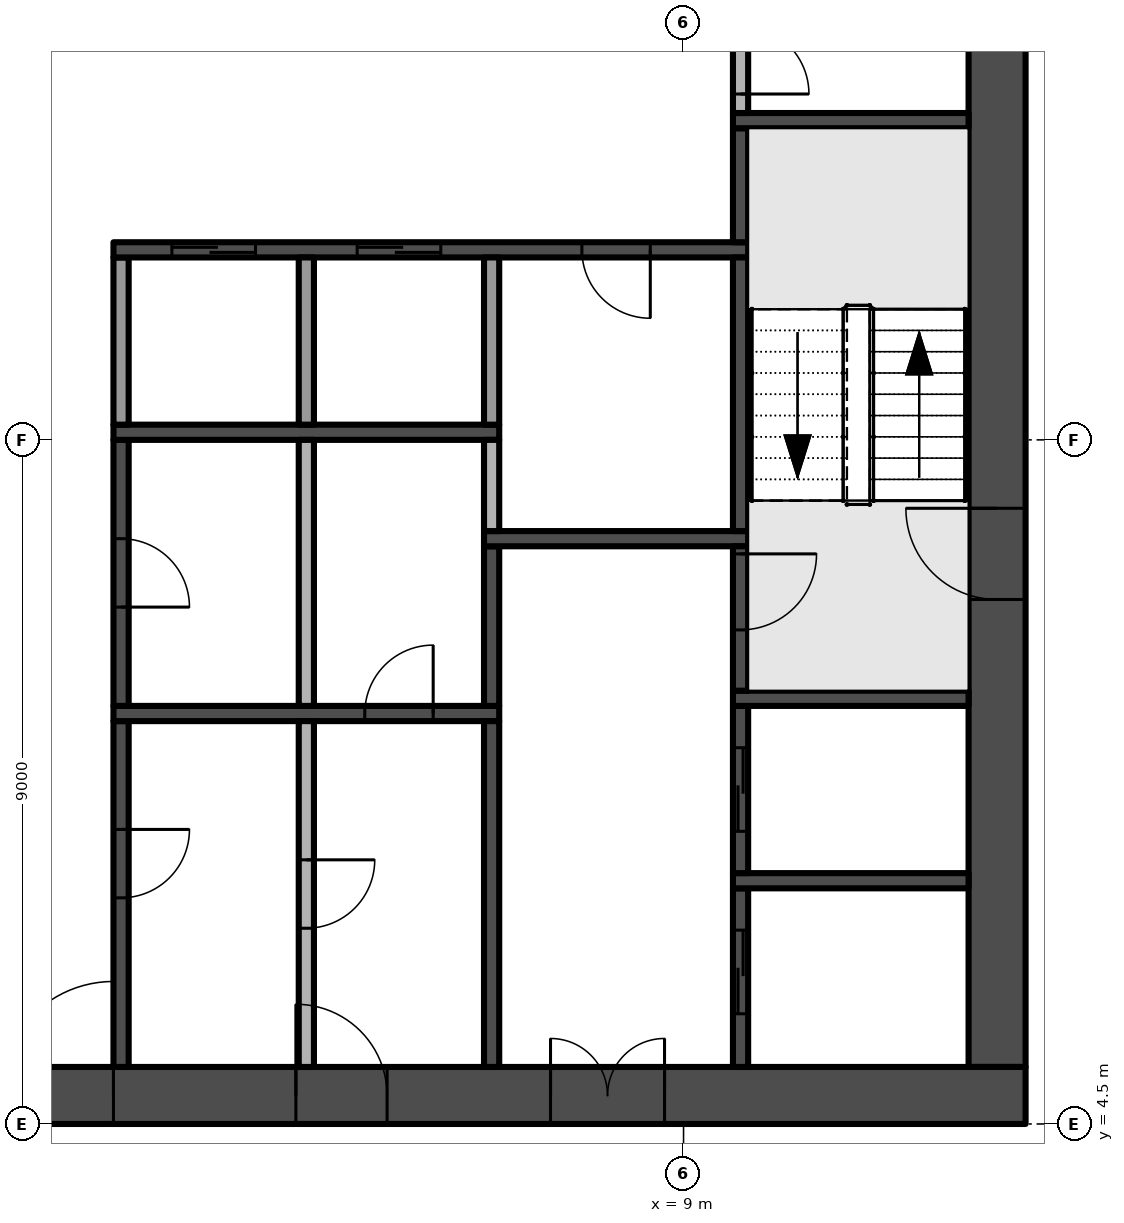
"""IFC4 building model, lengths in metres.
Left out: names, types, materials, properties, quantities, classifications, styles, units other than length and angle.
Written with IfcOpenShell. Run it as: python <this file> out.ifc"""

import sys

from ifc_helpers import new_model, si_unit, direction, frame, frame_2d, origin, place, context, subcontext, project, spatial, rectangle, extrude, element, fill, save


model = new_model("IFC4")
c1 = context("Model", 3, precision=1e-05, world=origin(), true_north=direction((0.0, 1.0)))
c2 = subcontext(c1, "Body", "Model", "MODEL_VIEW")
j1 = project(units=[si_unit("LENGTHUNIT", "METRE"), si_unit("PLANEANGLEUNIT", "RADIAN")], contexts=[c1])
p1 = place(None, origin())
s1 = spatial("IfcSite", under=j1, at=p1, CompositionType="ELEMENT")
p2 = place(p1, origin())
s2 = spatial("IfcBuilding", under=s1, at=p2, CompositionType="ELEMENT")
p3 = place(p2, frame((0.0, 0.0, 174.4)))
s3 = spatial("IfcBuildingStorey", under=s2, at=p3, CompositionType="ELEMENT", Elevation=174.4)
p4 = place(p3, frame((-13.5, 4.875, -0.3), z_axis=(0.0, 0.0, 1.0), x_axis=(1.0, 0.0, 0.0)))
e1 = element("IfcWall", 1, at=p4, inside=s3, PredefinedType="SHEAR", context=c2, shape_type="SweptSolid", body=[
    extrude(rectangle(XDim=27.0, YDim=0.75, at=frame_2d((13.5, 0.0))), origin(), (0.0, 0.0, 1.0), 5.0),
])
p5 = place(p4, frame((12.0, 0.0, 0.3)))
e2 = element("IfcOpeningElement", 2, at=p5, cuts=e1, PredefinedType="OPENING", context=c2, shape_type="SweptSolid", body=[
    extrude(rectangle(XDim=3.0, YDim=2.4, at=frame_2d((1.5, 1.2))), frame((0.0, 0.385, 0.0), z_axis=(0.0, -1.0, 0.0), x_axis=(1.0, 0.0, 0.0)), (0.0, 0.0, 1.0), 0.77),
])
p6 = place(p4, frame((4.9, 0.0, 0.3)))
e3 = element("IfcOpeningElement", 3, at=p6, cuts=e1, PredefinedType="OPENING", context=c2, shape_type="SweptSolid", body=[
    extrude(rectangle(XDim=1.2, YDim=2.2, at=frame_2d((0.6, 1.1))), frame((0.0, 0.385, 0.0), z_axis=(0.0, -1.0, 0.0), x_axis=(1.0, 0.0, 0.0)), (0.0, 0.0, 1.0), 0.77),
])
p7 = place(p4, frame((20.75, 0.0, 0.3)))
e4 = element("IfcOpeningElement", 4, at=p7, cuts=e1, PredefinedType="OPENING", context=c2, shape_type="SweptSolid", body=[
    extrude(rectangle(XDim=1.5, YDim=2.2, at=frame_2d((0.75, 1.1))), frame((0.0, 0.385, 0.0), z_axis=(0.0, -1.0, 0.0), x_axis=(1.0, 0.0, 0.0)), (0.0, 0.0, 1.0), 0.77),
])
p8 = place(p4, frame((17.4, 0.0, 0.3)))
e5 = element("IfcOpeningElement", 5, at=p8, cuts=e1, PredefinedType="OPENING", context=c2, shape_type="SweptSolid", body=[
    extrude(rectangle(XDim=1.2, YDim=2.2, at=frame_2d((0.6, 1.1))), frame((0.0, 0.385, 0.0), z_axis=(0.0, -1.0, 0.0), x_axis=(1.0, 0.0, 0.0)), (0.0, 0.0, 1.0), 0.77),
])
p9 = place(p3, frame((13.125, 5.25, -0.3), z_axis=(0.0, 0.0, 1.0), x_axis=(0.0, 1.0, 0.0)))
e6 = element("IfcWall", 6, at=p9, inside=s3, PredefinedType="SHEAR", context=c2, shape_type="SweptSolid", body=[
    extrude(rectangle(XDim=16.5, YDim=0.75, at=frame_2d((8.25, 0.0))), origin(), (0.0, 0.0, 1.0), 5.0),
])
p10 = place(p9, frame((6.15, 0.0, 0.3)))
e7 = element("IfcOpeningElement", 7, at=p10, cuts=e6, PredefinedType="OPENING", context=c2, shape_type="SweptSolid", body=[
    extrude(rectangle(XDim=1.2, YDim=2.2, at=frame_2d((0.6, 1.1))), frame((0.0, 0.385, 0.0), z_axis=(0.0, -1.0, 0.0), x_axis=(1.0, 0.0, 0.0)), (0.0, 0.0, 1.0), 0.77),
])
p11 = place(p3, frame((1.6, 9.8, 0.0), z_axis=(0.0, 0.0, 1.0), x_axis=(0.0, -1.0, 0.0)))
e8 = element("IfcWall", 8, at=p11, inside=s3, PredefinedType="SHEAR", context=c2, shape_type="SweptSolid", body=[
    extrude(rectangle(XDim=4.55, YDim=0.2, at=frame_2d((2.275, 0.0))), origin(), (0.0, 0.0, 1.0), 4.7),
])
p12 = place(p11, frame((1.425, 0.0, 0.0)))
e9 = element("IfcOpeningElement", 9, at=p12, cuts=e8, PredefinedType="OPENING", context=c2, shape_type="SweptSolid", body=[
    extrude(rectangle(XDim=0.9, YDim=2.1, at=frame_2d((0.45, 1.05))), frame((0.0, 0.11, 0.0), z_axis=(0.0, -1.0, 0.0), x_axis=(1.0, 0.0, 0.0)), (0.0, 0.0, 1.0), 0.22),
])
p13 = place(p3, frame((1.5, 9.9, 0.0), z_axis=(0.0, 0.0, 1.0), x_axis=(1.0, 0.0, 0.0)))
e10 = element("IfcWall", 10, at=p13, inside=s3, PredefinedType="SHEAR", context=c2, shape_type="SweptSolid", body=[
    extrude(rectangle(XDim=5.075, YDim=0.2, at=frame_2d((2.538, 0.0))), origin(), (0.0, 0.0, 1.0), 4.7),
])
p14 = place(p13, frame((3.306, 0.0, 0.0)))
e11 = element("IfcOpeningElement", 11, at=p14, cuts=e10, PredefinedType="OPENING", context=c2, shape_type="SweptSolid", body=[
    extrude(rectangle(XDim=0.9, YDim=2.1, at=frame_2d((0.45, 1.05))), frame((0.0, 0.11, 0.0), z_axis=(0.0, -1.0, 0.0), x_axis=(1.0, 0.0, 0.0)), (0.0, 0.0, 1.0), 0.22),
])
p15 = place(p3, frame((1.6, 13.5, 0.0), z_axis=(0.0, 0.0, 1.0), x_axis=(0.0, -1.0, 0.0)))
e12 = element("IfcWall", 12, at=p15, inside=s3, PredefinedType="SHEAR", context=c2, shape_type="SweptSolid", body=[
    extrude(rectangle(XDim=3.5, YDim=0.2, at=frame_2d((1.75, 0.0))), origin(), (0.0, 0.0, 1.0), 4.7),
])
p16 = place(p15, frame((1.3, 0.0, 0.0)))
e13 = element("IfcOpeningElement", 13, at=p16, cuts=e12, PredefinedType="OPENING", context=c2, shape_type="SweptSolid", body=[
    extrude(rectangle(XDim=0.9, YDim=2.1, at=frame_2d((0.45, 1.05))), frame((0.0, 0.11, 0.0), z_axis=(0.0, -1.0, 0.0), x_axis=(1.0, 0.0, 0.0)), (0.0, 0.0, 1.0), 0.22),
])
p17 = place(p3, frame((1.5, 13.6, 0.0), z_axis=(0.0, 0.0, 1.0), x_axis=(1.0, 0.0, 0.0)))
e14 = element("IfcWall", 14, at=p17, inside=s3, PredefinedType="SHEAR", context=c2, shape_type="SweptSolid", body=[
    extrude(rectangle(XDim=5.075, YDim=0.2, at=frame_2d((2.538, 0.0))), origin(), (0.0, 0.0, 1.0), 4.7),
])
p18 = place(p3, frame((1.6, 13.7, 0.0), z_axis=(0.0, 0.0, 1.0), x_axis=(0.0, 1.0, 0.0)))
e15 = element("IfcWall", 15, at=p18, inside=s3, PredefinedType="PARTITIONING", context=c2, shape_type="SweptSolid", body=[
    extrude(rectangle(XDim=2.2, YDim=0.2, at=frame_2d((1.1, 0.0))), origin(), (0.0, 0.0, 1.0), 4.7),
])
p19 = place(p3, frame((9.85, 16.0, 0.0), z_axis=(0.0, 0.0, 1.0), x_axis=(-1.0, 0.0, 0.0)))
e16 = element("IfcWall", 16, at=p19, inside=s3, PredefinedType="SHEAR", context=c2, shape_type="SweptSolid", body=[
    extrude(rectangle(XDim=8.35, YDim=0.2, at=frame_2d((4.175, 0.0))), origin(), (0.0, 0.0, 1.0), 4.7),
])
p20 = place(p19, frame((6.481, 0.0, 0.0)))
e17 = element("IfcOpeningElement", 17, at=p20, cuts=e16, PredefinedType="OPENING", context=c2, shape_type="SweptSolid", body=[
    extrude(rectangle(XDim=1.1, YDim=2.1, at=frame_2d((0.55, 1.05))), frame((0.0, 0.11, 0.0), z_axis=(0.0, -1.0, 0.0), x_axis=(1.0, 0.0, 0.0)), (0.0, 0.0, 1.0), 0.22),
])
p21 = place(p19, frame((4.044, 0.0, 0.0)))
e18 = element("IfcOpeningElement", 18, at=p21, cuts=e16, PredefinedType="OPENING", context=c2, shape_type="SweptSolid", body=[
    extrude(rectangle(XDim=1.1, YDim=2.1, at=frame_2d((0.55, 1.05))), frame((0.0, 0.11, 0.0), z_axis=(0.0, -1.0, 0.0), x_axis=(1.0, 0.0, 0.0)), (0.0, 0.0, 1.0), 0.22),
])
p22 = place(p19, frame((1.288, 0.0, 0.0)))
e19 = element("IfcOpeningElement", 19, at=p22, cuts=e16, PredefinedType="OPENING", context=c2, shape_type="SweptSolid", body=[
    extrude(rectangle(XDim=0.9, YDim=2.1, at=frame_2d((0.45, 1.05))), frame((0.0, 0.11, 0.0), z_axis=(0.0, -1.0, 0.0), x_axis=(1.0, 0.0, 0.0)), (0.0, 0.0, 1.0), 0.22),
])
p23 = place(p3, frame((4.037, 9.8, 0.0), z_axis=(0.0, 0.0, 1.0), x_axis=(0.0, -1.0, 0.0)))
e20 = element("IfcWall", 20, at=p23, inside=s3, PredefinedType="PARTITIONING", context=c2, shape_type="SweptSolid", body=[
    extrude(rectangle(XDim=4.55, YDim=0.2, at=frame_2d((2.275, 0.0))), origin(), (0.0, 0.0, 1.0), 4.7),
])
p24 = place(p23, frame((1.825, 0.0, 0.0)))
e21 = element("IfcOpeningElement", 21, at=p24, cuts=e20, PredefinedType="OPENING", context=c2, shape_type="SweptSolid", body=[
    extrude(rectangle(XDim=0.9, YDim=2.1, at=frame_2d((0.45, 1.05))), frame((0.0, 0.11, 0.0), z_axis=(0.0, -1.0, 0.0), x_axis=(1.0, 0.0, 0.0)), (0.0, 0.0, 1.0), 0.22),
])
p25 = place(p3, frame((4.037, 10.0, 0.0), z_axis=(0.0, 0.0, 1.0), x_axis=(0.0, 1.0, 0.0)))
e22 = element("IfcWall", 22, at=p25, inside=s3, PredefinedType="PARTITIONING", context=c2, shape_type="SweptSolid", body=[
    extrude(rectangle(XDim=3.5, YDim=0.2, at=frame_2d((1.75, 0.0))), origin(), (0.0, 0.0, 1.0), 4.7),
])
p26 = place(p3, frame((4.037, 13.7, 0.0), z_axis=(0.0, 0.0, 1.0), x_axis=(0.0, 1.0, 0.0)))
e23 = element("IfcWall", 23, at=p26, inside=s3, PredefinedType="PARTITIONING", context=c2, shape_type="SweptSolid", body=[
    extrude(rectangle(XDim=2.2, YDim=0.2, at=frame_2d((1.1, 0.0))), origin(), (0.0, 0.0, 1.0), 4.7),
])
p27 = place(p3, frame((6.475, 5.25, 0.0), z_axis=(0.0, 0.0, 1.0), x_axis=(0.0, 1.0, 0.0)))
e24 = element("IfcWall", 24, at=p27, inside=s3, PredefinedType="SHEAR", context=c2, shape_type="SweptSolid", body=[
    extrude(rectangle(XDim=4.55, YDim=0.2, at=frame_2d((2.275, 0.0))), origin(), (0.0, 0.0, 1.0), 4.7),
])
p28 = place(p3, frame((6.475, 10.0, 0.0), z_axis=(0.0, 0.0, 1.0), x_axis=(0.0, 1.0, 0.0)))
e25 = element("IfcWall", 25, at=p28, inside=s3, PredefinedType="SHEAR", context=c2, shape_type="SweptSolid", body=[
    extrude(rectangle(XDim=2.1, YDim=0.2, at=frame_2d((1.05, 0.0))), origin(), (0.0, 0.0, 1.0), 4.7),
])
p29 = place(p3, frame((6.375, 12.2, 0.0), z_axis=(0.0, 0.0, 1.0), x_axis=(1.0, 0.0, 0.0)))
e26 = element("IfcWall", 26, at=p29, inside=s3, PredefinedType="SHEAR", context=c2, shape_type="SweptSolid", body=[
    extrude(rectangle(XDim=3.475, YDim=0.2, at=frame_2d((1.738, 0.0))), origin(), (0.0, 0.0, 1.0), 4.7),
])
p30 = place(p3, frame((6.475, 12.3, 0.0), z_axis=(0.0, 0.0, 1.0), x_axis=(0.0, 1.0, 0.0)))
e27 = element("IfcWall", 27, at=p30, inside=s3, PredefinedType="PARTITIONING", context=c2, shape_type="SweptSolid", body=[
    extrude(rectangle(XDim=1.2, YDim=0.2, at=frame_2d((0.6, 0.0))), origin(), (0.0, 0.0, 1.0), 4.7),
])
p31 = place(p3, frame((6.475, 13.7, 0.0), z_axis=(0.0, 0.0, 1.0), x_axis=(0.0, 1.0, 0.0)))
e28 = element("IfcWall", 28, at=p31, inside=s3, PredefinedType="PARTITIONING", context=c2, shape_type="SweptSolid", body=[
    extrude(rectangle(XDim=2.2, YDim=0.2, at=frame_2d((1.1, 0.0))), origin(), (0.0, 0.0, 1.0), 4.7),
])
p32 = place(p3, frame((9.75, 5.25, 0.0), z_axis=(0.0, 0.0, 1.0), x_axis=(0.0, 1.0, 0.0)))
e29 = element("IfcWall", 29, at=p32, inside=s3, PredefinedType="SHEAR", context=c2, shape_type="SweptSolid", body=[
    extrude(rectangle(XDim=2.35, YDim=0.2, at=frame_2d((1.175, 0.0))), origin(), (0.0, 0.0, 1.0), 4.7),
])
p33 = place(p32, frame((0.7, 0.0, 0.0)))
e30 = element("IfcOpeningElement", 30, at=p33, cuts=e29, PredefinedType="OPENING", context=c2, shape_type="SweptSolid", body=[
    extrude(rectangle(XDim=1.1, YDim=2.1, at=frame_2d((0.55, 1.05))), frame((0.0, 0.11, 0.0), z_axis=(0.0, -1.0, 0.0), x_axis=(1.0, 0.0, 0.0)), (0.0, 0.0, 1.0), 0.22),
])
p34 = place(p3, frame((9.65, 7.7, 0.0), z_axis=(0.0, 0.0, 1.0), x_axis=(1.0, 0.0, 0.0)))
e31 = element("IfcWall", 31, at=p34, inside=s3, PredefinedType="SHEAR", context=c2, shape_type="SweptSolid", body=[
    extrude(rectangle(XDim=3.1, YDim=0.2, at=frame_2d((1.55, 0.0))), origin(), (0.0, 0.0, 1.0), 4.7),
])
p35 = place(p3, frame((9.75, 7.8, 0.0), z_axis=(0.0, 0.0, 1.0), x_axis=(0.0, 1.0, 0.0)))
e32 = element("IfcWall", 32, at=p35, inside=s3, PredefinedType="SHEAR", context=c2, shape_type="SweptSolid", body=[
    extrude(rectangle(XDim=2.2, YDim=0.2, at=frame_2d((1.1, 0.0))), origin(), (0.0, 0.0, 1.0), 4.7),
])
p36 = place(p35, frame((0.55, 0.0, 0.0)))
e33 = element("IfcOpeningElement", 33, at=p36, cuts=e32, PredefinedType="OPENING", context=c2, shape_type="SweptSolid", body=[
    extrude(rectangle(XDim=1.1, YDim=2.1, at=frame_2d((0.55, 1.05))), frame((0.0, 0.11, 0.0), z_axis=(0.0, -1.0, 0.0), x_axis=(1.0, 0.0, 0.0)), (0.0, 0.0, 1.0), 0.22),
])
p37 = place(p3, frame((9.65, 10.1, 0.0), z_axis=(0.0, 0.0, 1.0), x_axis=(1.0, 0.0, 0.0)))
e34 = element("IfcWall", 34, at=p37, inside=s3, PredefinedType="SHEAR", context=c2, shape_type="SweptSolid", body=[
    extrude(rectangle(XDim=3.1, YDim=0.2, at=frame_2d((1.55, 0.0))), origin(), (0.0, 0.0, 1.0), 4.7),
])
p38 = place(p3, frame((9.75, 12.1, 0.0), z_axis=(0.0, 0.0, 1.0), x_axis=(0.0, -1.0, 0.0)))
e35 = element("IfcWall", 35, at=p38, inside=s3, PredefinedType="SHEAR", context=c2, shape_type="SweptSolid", body=[
    extrude(rectangle(XDim=1.9, YDim=0.2, at=frame_2d((0.95, 0.0))), origin(), (0.0, 0.0, 1.0), 4.7),
])
p39 = place(p38, frame((0.1, 0.0, 0.0)))
e36 = element("IfcOpeningElement", 36, at=p39, cuts=e35, PredefinedType="OPENING", context=c2, shape_type="SweptSolid", body=[
    extrude(rectangle(XDim=1.0, YDim=2.2, at=frame_2d((0.5, 1.1))), frame((0.0, 0.11, 0.0), z_axis=(0.0, -1.0, 0.0), x_axis=(1.0, 0.0, 0.0)), (0.0, 0.0, 1.0), 0.22),
])
p40 = place(p3, frame((9.75, 12.3, 0.0), z_axis=(0.0, 0.0, 1.0), x_axis=(0.0, 1.0, 0.0)))
e37 = element("IfcWall", 37, at=p40, inside=s3, PredefinedType="SHEAR", context=c2, shape_type="SweptSolid", body=[
    extrude(rectangle(XDim=3.6, YDim=0.2, at=frame_2d((1.8, 0.0))), origin(), (0.0, 0.0, 1.0), 4.7),
])
p41 = place(p3, frame((9.75, 16.1, 0.0), z_axis=(0.0, 0.0, 1.0), x_axis=(0.0, 1.0, 0.0)))
e38 = element("IfcWall", 38, at=p41, inside=s3, PredefinedType="SHEAR", context=c2, shape_type="SweptSolid", body=[
    extrude(rectangle(XDim=1.5, YDim=0.2, at=frame_2d((0.75, 0.0))), origin(), (0.0, 0.0, 1.0), 4.7),
])
p42 = place(p3, frame((9.65, 17.7, 0.0), z_axis=(0.0, 0.0, 1.0), x_axis=(1.0, 0.0, 0.0)))
e39 = element("IfcWall", 39, at=p42, inside=s3, PredefinedType="SHEAR", context=c2, shape_type="SweptSolid", body=[
    extrude(rectangle(XDim=3.1, YDim=0.2, at=frame_2d((1.55, 0.0))), origin(), (0.0, 0.0, 1.0), 4.7),
])
p43 = place(p3, frame((9.75, 19.2, 0.0), z_axis=(0.0, 0.0, 1.0), x_axis=(0.0, -1.0, 0.0)))
e40 = element("IfcWall", 40, at=p43, inside=s3, PredefinedType="PARTITIONING", context=c2, shape_type="SweptSolid", body=[
    extrude(rectangle(XDim=1.4, YDim=0.2, at=frame_2d((0.7, 0.0))), origin(), (0.0, 0.0, 1.0), 4.7),
])
p44 = place(p43, frame((0.25, 0.0, 0.0)))
e41 = element("IfcOpeningElement", 41, at=p44, cuts=e40, PredefinedType="OPENING", context=c2, shape_type="SweptSolid", body=[
    extrude(rectangle(XDim=0.9, YDim=2.1, at=frame_2d((0.45, 1.05))), frame((0.0, 0.11, 0.0), z_axis=(0.0, -1.0, 0.0), x_axis=(1.0, 0.0, 0.0)), (0.0, 0.0, 1.0), 0.22),
])
p45 = place(p5, frame((3.0, 0.0, 0.0), z_axis=(0.0, 0.0, 1.0), x_axis=(-1.0, 0.0, 0.0)))
e42 = element("IfcDoor", 42, at=p45, inside=s3, OperationType="DOUBLE_DOOR_SINGLE_SWING", PredefinedType="DOOR", context=c2, shape_type="SweptSolid", body=[
    extrude(rectangle(XDim=3.0, YDim=2.4, at=frame_2d((1.5, 1.2))), frame((0.0, 0.025, 0.0), z_axis=(0.0, -1.0, 0.0), x_axis=(1.0, 0.0, 0.0)), (0.0, 0.0, 1.0), 0.05),
])
fill(e2, e42)
p46 = place(p10, frame((1.2, 0.0, 0.0), z_axis=(0.0, 0.0, 1.0), x_axis=(-1.0, 0.0, 0.0)))
e43 = element("IfcDoor", 43, at=p46, inside=s3, OperationType="SINGLE_SWING_LEFT", PredefinedType="DOOR", context=c2, shape_type="SweptSolid", body=[
    extrude(rectangle(XDim=1.2, YDim=2.2, at=frame_2d((0.6, 1.1))), frame((0.0, 0.025, 0.0), z_axis=(0.0, -1.0, 0.0), x_axis=(1.0, 0.0, 0.0)), (0.0, 0.0, 1.0), 0.05),
])
fill(e7, e43)
p47 = place(p7, frame((1.5, 0.0, 0.0), z_axis=(0.0, 0.0, 1.0), x_axis=(-1.0, 0.0, 0.0)))
e44 = element("IfcDoor", 44, at=p47, inside=s3, OperationType="DOUBLE_DOOR_SINGLE_SWING", PredefinedType="DOOR", context=c2, shape_type="SweptSolid", body=[
    extrude(rectangle(XDim=1.5, YDim=2.2, at=frame_2d((0.75, 1.1))), frame((0.0, 0.025, 0.0), z_axis=(0.0, -1.0, 0.0), x_axis=(1.0, 0.0, 0.0)), (0.0, 0.0, 1.0), 0.05),
])
fill(e4, e44)
p48 = place(p8, frame((1.2, 0.0, 0.0), z_axis=(0.0, 0.0, 1.0), x_axis=(-1.0, 0.0, 0.0)))
e45 = element("IfcDoor", 45, at=p48, inside=s3, OperationType="SINGLE_SWING_RIGHT", PredefinedType="DOOR", context=c2, shape_type="SweptSolid", body=[
    extrude(rectangle(XDim=1.2, YDim=2.2, at=frame_2d((0.6, 1.1))), frame((0.0, 0.025, 0.0), z_axis=(0.0, -1.0, 0.0), x_axis=(1.0, 0.0, 0.0)), (0.0, 0.0, 1.0), 0.05),
])
fill(e5, e45)
p49 = place(p39, origin())
e46 = element("IfcDoor", 46, at=p49, inside=s3, OperationType="SINGLE_SWING_LEFT", PredefinedType="DOOR", context=c2, shape_type="SweptSolid", body=[
    extrude(rectangle(XDim=1.0, YDim=2.2, at=frame_2d((0.5, 1.1))), frame((0.0, 0.025, 0.0), z_axis=(0.0, -1.0, 0.0), x_axis=(1.0, 0.0, 0.0)), (0.0, 0.0, 1.0), 0.05),
])
fill(e36, e46)
p50 = place(p20, origin())
e47 = element("IfcDoor", 47, at=p50, inside=s3, OperationType="SLIDING_TO_RIGHT", PredefinedType="DOOR", context=c2, shape_type="SweptSolid", body=[
    extrude(rectangle(XDim=1.1, YDim=2.1, at=frame_2d((0.55, 1.05))), frame((0.0, 0.025, 0.0), z_axis=(0.0, -1.0, 0.0), x_axis=(1.0, 0.0, 0.0)), (0.0, 0.0, 1.0), 0.05),
])
fill(e17, e47)
p51 = place(p21, origin())
e48 = element("IfcDoor", 48, at=p51, inside=s3, OperationType="SLIDING_TO_RIGHT", PredefinedType="DOOR", context=c2, shape_type="SweptSolid", body=[
    extrude(rectangle(XDim=1.1, YDim=2.1, at=frame_2d((0.55, 1.05))), frame((0.0, 0.025, 0.0), z_axis=(0.0, -1.0, 0.0), x_axis=(1.0, 0.0, 0.0)), (0.0, 0.0, 1.0), 0.05),
])
fill(e18, e48)
p52 = place(p33, origin())
e49 = element("IfcDoor", 49, at=p52, inside=s3, OperationType="SLIDING_TO_RIGHT", PredefinedType="DOOR", context=c2, shape_type="SweptSolid", body=[
    extrude(rectangle(XDim=1.1, YDim=2.1, at=frame_2d((0.55, 1.05))), frame((0.0, 0.025, 0.0), z_axis=(0.0, -1.0, 0.0), x_axis=(1.0, 0.0, 0.0)), (0.0, 0.0, 1.0), 0.05),
])
fill(e30, e49)
p53 = place(p36, origin())
e50 = element("IfcDoor", 50, at=p53, inside=s3, OperationType="SLIDING_TO_RIGHT", PredefinedType="DOOR", context=c2, shape_type="SweptSolid", body=[
    extrude(rectangle(XDim=1.1, YDim=2.1, at=frame_2d((0.55, 1.05))), frame((0.0, 0.025, 0.0), z_axis=(0.0, -1.0, 0.0), x_axis=(1.0, 0.0, 0.0)), (0.0, 0.0, 1.0), 0.05),
])
fill(e33, e50)
p54 = place(p12, origin())
e51 = element("IfcDoor", 51, at=p54, inside=s3, OperationType="SINGLE_SWING_LEFT", PredefinedType="DOOR", context=c2, shape_type="SweptSolid", body=[
    extrude(rectangle(XDim=0.9, YDim=2.1, at=frame_2d((0.45, 1.05))), frame((0.0, 0.025, 0.0), z_axis=(0.0, -1.0, 0.0), x_axis=(1.0, 0.0, 0.0)), (0.0, 0.0, 1.0), 0.05),
])
fill(e9, e51)
p55 = place(p24, origin())
e52 = element("IfcDoor", 52, at=p55, inside=s3, OperationType="SINGLE_SWING_LEFT", PredefinedType="DOOR", context=c2, shape_type="SweptSolid", body=[
    extrude(rectangle(XDim=0.9, YDim=2.1, at=frame_2d((0.45, 1.05))), frame((0.0, 0.025, 0.0), z_axis=(0.0, -1.0, 0.0), x_axis=(1.0, 0.0, 0.0)), (0.0, 0.0, 1.0), 0.05),
])
fill(e21, e52)
p56 = place(p16, origin())
e53 = element("IfcDoor", 53, at=p56, inside=s3, OperationType="SINGLE_SWING_RIGHT", PredefinedType="DOOR", context=c2, shape_type="SweptSolid", body=[
    extrude(rectangle(XDim=0.9, YDim=2.1, at=frame_2d((0.45, 1.05))), frame((0.0, 0.025, 0.0), z_axis=(0.0, -1.0, 0.0), x_axis=(1.0, 0.0, 0.0)), (0.0, 0.0, 1.0), 0.05),
])
fill(e13, e53)
p57 = place(p14, origin())
e54 = element("IfcDoor", 54, at=p57, inside=s3, OperationType="SINGLE_SWING_RIGHT", PredefinedType="DOOR", context=c2, shape_type="SweptSolid", body=[
    extrude(rectangle(XDim=0.9, YDim=2.1, at=frame_2d((0.45, 1.05))), frame((0.0, 0.025, 0.0), z_axis=(0.0, -1.0, 0.0), x_axis=(1.0, 0.0, 0.0)), (0.0, 0.0, 1.0), 0.05),
])
fill(e11, e54)
p58 = place(p22, origin())
e55 = element("IfcDoor", 55, at=p58, inside=s3, OperationType="SINGLE_SWING_LEFT", PredefinedType="DOOR", context=c2, shape_type="SweptSolid", body=[
    extrude(rectangle(XDim=0.9, YDim=2.1, at=frame_2d((0.45, 1.05))), frame((0.0, 0.025, 0.0), z_axis=(0.0, -1.0, 0.0), x_axis=(1.0, 0.0, 0.0)), (0.0, 0.0, 1.0), 0.05),
])
fill(e19, e55)
p59 = place(p44, origin())
e56 = element("IfcDoor", 56, at=p59, inside=s3, OperationType="SINGLE_SWING_RIGHT", PredefinedType="DOOR", context=c2, shape_type="SweptSolid", body=[
    extrude(rectangle(XDim=0.9, YDim=2.1, at=frame_2d((0.45, 1.05))), frame((0.0, 0.025, 0.0), z_axis=(0.0, -1.0, 0.0), x_axis=(1.0, 0.0, 0.0)), (0.0, 0.0, 1.0), 0.05),
])
fill(e41, e56)
save(model, sys.argv[1])
